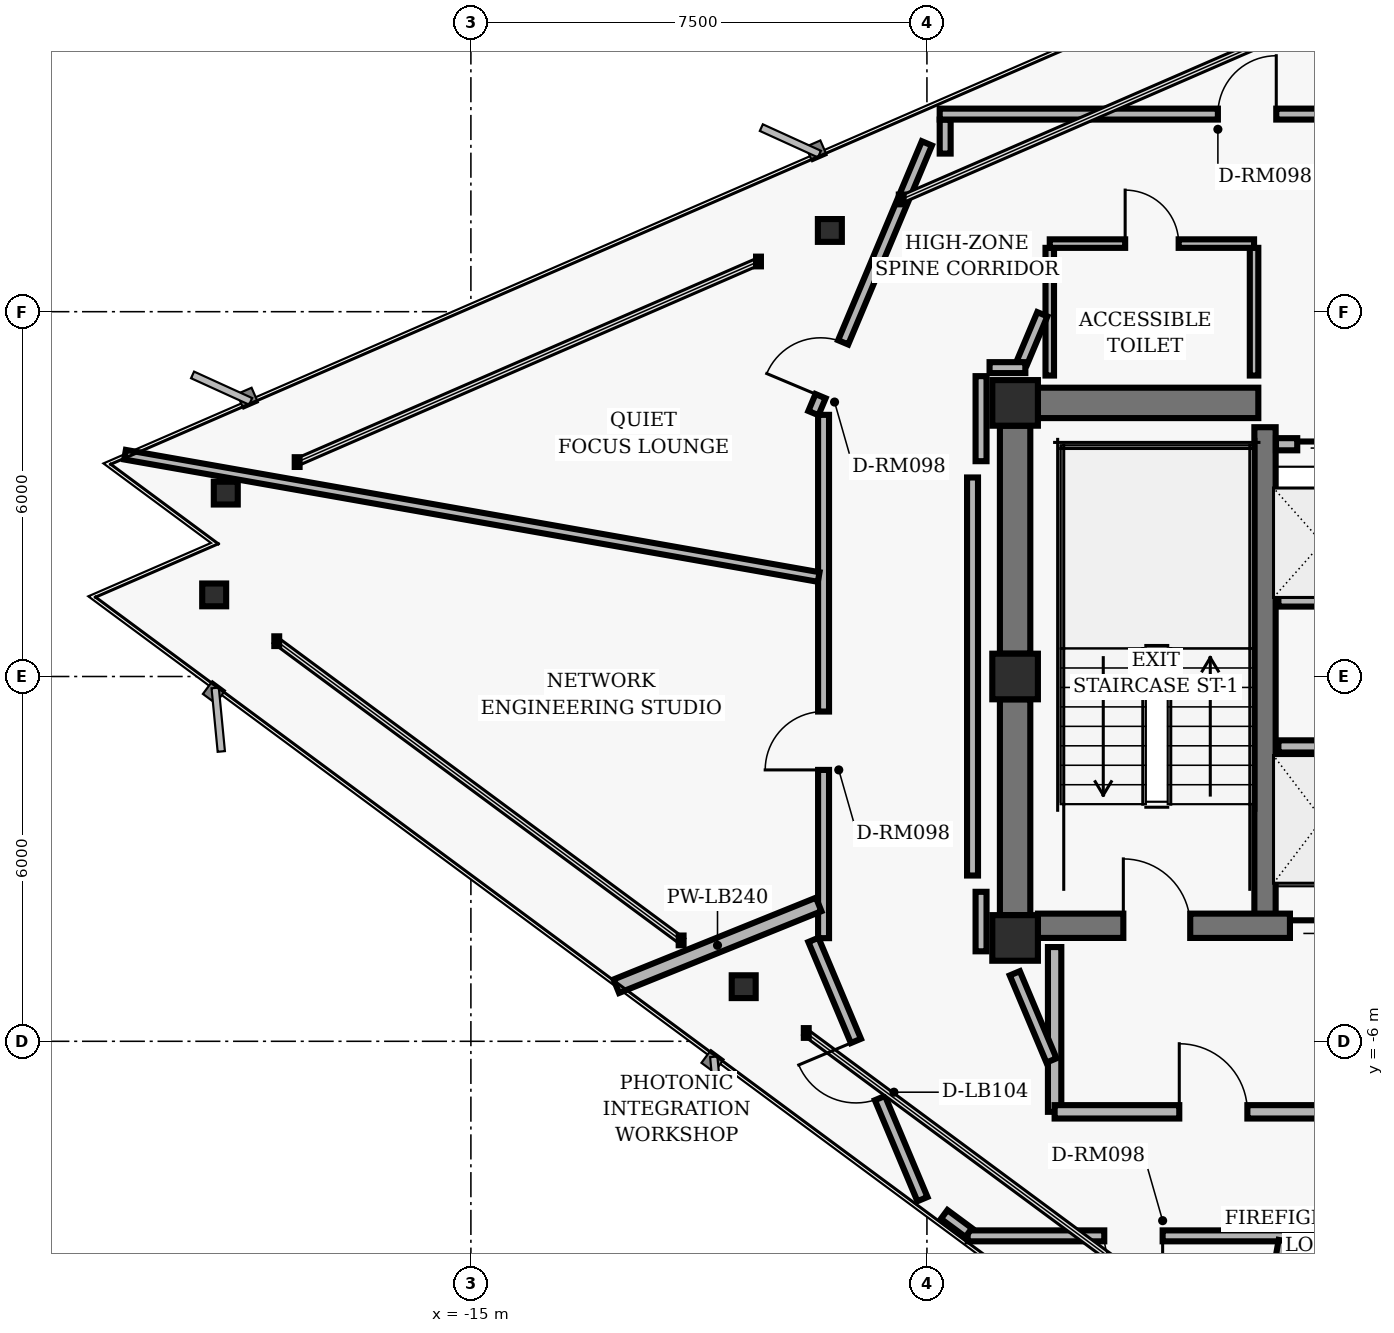
"""IFC4 building model, lengths in metres.
Left out: names, types, materials, properties, quantities, classifications, styles, units other than length and angle.
Written with IfcOpenShell. Run it as: python <this file> out.ifc"""

import sys

from ifc_helpers import new_model, si_unit, direction, frame, frame_2d, origin, origin_2d, place, context, subcontext, project, spatial, rectangle, hollow_rectangle, i_section, extrude, element, fill, save


model = new_model("IFC4")
c1 = context("Model", 3, precision=1e-05, world=origin(), true_north=direction((0.0, 1.0)))
c2 = subcontext(c1, "Body", "Model", "MODEL_VIEW")
j1 = project(units=[si_unit("LENGTHUNIT", "METRE"), si_unit("PLANEANGLEUNIT", "RADIAN")], contexts=[c1])
p1 = place(None, origin())
s1 = spatial("IfcSite", under=j1, at=p1, CompositionType="ELEMENT")
p2 = place(p1, origin())
s2 = spatial("IfcBuilding", under=s1, at=p2, CompositionType="ELEMENT")
p3 = place(p2, frame((0.0, 0.0, 214.88)))
s3 = spatial("IfcBuildingStorey", under=s2, at=p3, CompositionType="ELEMENT", Elevation=214.88)
for number, where, z_axis, x_axis in (
    (1, (-6.05, 4.5, 0.0), (0.0, 0.0, 1.0), (1.0, 0.0, 0.0)),
    (2, (-6.05, 0.0, 0.0), (0.0, 0.0, 1.0), (1.0, 0.0, 0.0)),
    (3, (-6.05, -4.3, 0.0), (0.0, 0.0, 1.0), (1.0, 0.0, 0.0)),
):
    element("IfcColumn", number, at=place(p3, frame(where, z_axis=z_axis, x_axis=x_axis)), inside=s3, PredefinedType="COLUMN", context=c2, shape_type="SweptSolid", body=[
        extrude(hollow_rectangle(XDim=0.75, YDim=0.75, WallThickness=0.05, InnerFilletRadius=0.02, OuterFilletRadius=0.04, at=origin_2d()), origin(), (0.0, 0.0, 1.0), 3.04),
    ])
p4 = place(p3, frame((-6.05, 0.375, 0.0), z_axis=(0.0, 0.0, 1.0), x_axis=(0.0, 1.0, 0.0)))
e4 = element("IfcWall", 4, at=p4, inside=s3, PredefinedType="SHEAR", context=c2, shape_type="SweptSolid", body=[
    extrude(rectangle(XDim=3.75, YDim=0.5, at=frame_2d((1.875, 0.0))), origin(), (0.0, 0.0, 1.0), 2.798),
])
p5 = place(p3, frame((-6.05, -3.925, 0.0), z_axis=(0.0, 0.0, 1.0), x_axis=(0.0, 1.0, 0.0)))
e5 = element("IfcWall", 5, at=p5, inside=s3, PredefinedType="SHEAR", context=c2, shape_type="SweptSolid", body=[
    extrude(rectangle(XDim=3.55, YDim=0.5, at=frame_2d((1.775, 0.0))), origin(), (0.0, 0.0, 1.0), 2.798),
])
p6 = place(p3, frame((-1.94, -4.1, 0.0), z_axis=(0.0, 0.0, 1.0), x_axis=(0.0, 1.0, 0.0)))
e6 = element("IfcWall", 6, at=p6, inside=s3, PredefinedType="SHEAR", context=c2, shape_type="SweptSolid", body=[
    extrude(rectangle(XDim=8.2, YDim=0.35, at=frame_2d((4.1, 0.0))), origin(), (0.0, 0.0, 1.0), 2.798),
])
p7 = place(p3, frame((-5.675, -4.1, 0.0), z_axis=(0.0, 0.0, 1.0), x_axis=(1.0, 0.0, 0.0)))
e7 = element("IfcWall", 7, at=p7, inside=s3, PredefinedType="SHEAR", context=c2, shape_type="SweptSolid", body=[
    extrude(rectangle(XDim=11.35, YDim=0.4, at=frame_2d((5.675, 0.0))), origin(), (0.0, 0.0, 1.0), 2.798),
])
p8 = place(p7, frame((1.405, 0.0, 0.0)))
e8 = element("IfcOpeningElement", 8, at=p8, cuts=e7, PredefinedType="OPENING", context=c2, shape_type="SweptSolid", body=[
    extrude(rectangle(XDim=1.1, YDim=2.04, at=frame_2d((0.55, 1.02))), frame((0.0, 0.21, 0.0), z_axis=(0.0, -1.0, 0.0), x_axis=(1.0, 0.0, 0.0)), (0.0, 0.0, 1.0), 0.42),
])
p9 = place(p7, frame((8.845, 0.0, 0.0)))
e9 = element("IfcOpeningElement", 9, at=p9, cuts=e7, PredefinedType="OPENING", context=c2, shape_type="SweptSolid", body=[
    extrude(rectangle(XDim=1.1, YDim=2.04, at=frame_2d((0.55, 1.02))), frame((0.0, 0.21, 0.0), z_axis=(0.0, -1.0, 0.0), x_axis=(1.0, 0.0, 0.0)), (0.0, 0.0, 1.0), 0.42),
])
p10 = place(p7, frame((4.145, 0.0, 0.0)))
e10 = element("IfcOpeningElement", 10, at=p10, cuts=e7, PredefinedType="OPENING", context=c2, shape_type="SweptSolid", body=[
    extrude(rectangle(XDim=1.06, YDim=2.04, at=frame_2d((0.53, 1.02))), frame((0.0, 0.21, 0.0), z_axis=(0.0, -1.0, 0.0), x_axis=(1.0, 0.0, 0.0)), (0.0, 0.0, 1.0), 0.42),
])
p11 = place(p7, frame((6.145, 0.0, 0.0)))
e11 = element("IfcOpeningElement", 11, at=p11, cuts=e7, PredefinedType="OPENING", context=c2, shape_type="SweptSolid", body=[
    extrude(rectangle(XDim=1.06, YDim=2.04, at=frame_2d((0.53, 1.02))), frame((0.0, 0.21, 0.0), z_axis=(0.0, -1.0, 0.0), x_axis=(1.0, 0.0, 0.0)), (0.0, 0.0, 1.0), 0.42),
])
p12 = place(p3, frame((-5.675, 4.5, 0.0), z_axis=(0.0, 0.0, 1.0), x_axis=(1.0, 0.0, 0.0)))
e12 = element("IfcWall", 12, at=p12, inside=s3, PredefinedType="SHEAR", context=c2, shape_type="SweptSolid", body=[
    extrude(rectangle(XDim=3.625, YDim=0.5, at=frame_2d((1.812, 0.0))), origin(), (0.0, 0.0, 1.0), 2.798),
])
for number, where, z_axis, x_axis in (
    (13, (-9.096, 7.336, 0.0), (0.0, 0.0, 1.0), (1.0, 0.0, 0.0)),
    (14, (-19.031, 3.016, 0.0), (0.0, 0.0, 1.0), (1.0, 0.0, 0.0)),
    (15, (-19.222, 1.342, 0.0), (0.0, 0.0, 1.0), (1.0, 0.0, 0.0)),
    (16, (-10.513, -5.102, 0.0), (0.0, 0.0, 1.0), (1.0, 0.0, 0.0)),
):
    element("IfcColumn", number, at=place(p3, frame(where, z_axis=z_axis, x_axis=x_axis)), inside=s3, PredefinedType="COLUMN", context=c2, shape_type="SweptSolid", body=[
        extrude(i_section(OverallWidth=0.394, OverallDepth=0.375, WebThickness=0.017, FlangeThickness=0.028, FilletRadius=0.016, at=origin_2d()), origin(), (0.0, 0.0, 1.0), 3.04),
    ])
p13 = place(p3, frame((-1.72, -1.15, 0.0), z_axis=(0.0, 0.0, 1.0), x_axis=(1.0, 0.0, 0.0)))
e17 = element("IfcWall", 17, at=p13, inside=s3, PredefinedType="PARTITIONING", context=c2, shape_type="SweptSolid", body=[
    extrude(rectangle(XDim=3.44, YDim=0.2, at=frame_2d((1.72, 0.0))), origin(), (0.0, 0.0, 1.0), 2.773),
])
p14 = place(p3, frame((-5.4, -7.16, 0.0), z_axis=(0.0, 0.0, 1.0), x_axis=(0.0, 1.0, 0.0)))
e18 = element("IfcWall", 18, at=p14, inside=s3, PredefinedType="PARTITIONING", context=c2, shape_type="SweptSolid", body=[
    extrude(rectangle(XDim=2.71, YDim=0.22, at=frame_2d((1.355, 0.0))), origin(), (0.0, 0.0, 1.0), 2.773),
])
p15 = place(p3, frame((-5.4, -7.16, 0.0), z_axis=(0.0, 0.0, 1.0), x_axis=(1.0, 0.0, 0.0)))
e19 = element("IfcWall", 19, at=p15, inside=s3, PredefinedType="PARTITIONING", context=c2, shape_type="SweptSolid", body=[
    extrude(rectangle(XDim=5.4, YDim=0.22, at=frame_2d((2.7, 0.0))), origin(), (0.0, 0.0, 1.0), 2.395),
])
p16 = place(p15, frame((2.05, 0.0, 0.0)))
e20 = element("IfcOpeningElement", 20, at=p16, cuts=e19, PredefinedType="OPENING", context=c2, shape_type="SweptSolid", body=[
    extrude(rectangle(XDim=1.12, YDim=2.02, at=frame_2d((0.56, 1.01))), frame((0.0, 0.12, 0.0), z_axis=(0.0, -1.0, 0.0), x_axis=(1.0, 0.0, 0.0)), (0.0, 0.0, 1.0), 0.24),
])
p17 = place(p3, frame((-1.72, 1.25, 0.0), z_axis=(0.0, 0.0, 1.0), x_axis=(1.0, 0.0, 0.0)))
e21 = element("IfcWall", 21, at=p17, inside=s3, PredefinedType="PARTITIONING", context=c2, shape_type="SweptSolid", body=[
    extrude(rectangle(XDim=3.44, YDim=0.2, at=frame_2d((1.72, 0.0))), origin(), (0.0, 0.0, 1.0), 2.773),
])
p18 = place(p3, frame((-1.76, 3.82, 0.0), z_axis=(0.0, 0.0, 1.0), x_axis=(1.0, 0.0, 0.0)))
e22 = element("IfcWall", 22, at=p18, inside=s3, PredefinedType="PARTITIONING", context=c2, shape_type="SweptSolid", body=[
    extrude(rectangle(XDim=3.52, YDim=0.2, at=frame_2d((1.76, 0.0))), origin(), (0.0, 0.0, 1.0), 2.773),
])
p19 = place(p18, frame((0.35, 0.0, 0.0)))
e23 = element("IfcOpeningElement", 23, at=p19, cuts=e22, PredefinedType="OPENING", context=c2, shape_type="SweptSolid", body=[
    extrude(rectangle(XDim=1.06, YDim=2.04, at=frame_2d((0.53, 1.02))), frame((0.0, 0.11, 0.0), z_axis=(0.0, -1.0, 0.0), x_axis=(1.0, 0.0, 0.0)), (0.0, 0.0, 1.0), 0.22),
])
p20 = place(p18, frame((2.11, 0.0, 0.0)))
e24 = element("IfcOpeningElement", 24, at=p20, cuts=e22, PredefinedType="OPENING", context=c2, shape_type="SweptSolid", body=[
    extrude(rectangle(XDim=1.06, YDim=2.04, at=frame_2d((0.53, 1.02))), frame((0.0, 0.11, 0.0), z_axis=(0.0, -1.0, 0.0), x_axis=(1.0, 0.0, 0.0)), (0.0, 0.0, 1.0), 0.22),
])
for number, where, z_axis, x_axis in (
    (25, (-5.48, 4.95, 0.0), (0.0, 0.0, 1.0), (0.0, 1.0, 0.0)),
    (26, (-2.12, 4.95, 0.0), (0.0, 0.0, 1.0), (0.0, 1.0, 0.0)),
):
    element("IfcWall", number, at=place(p3, frame(where, z_axis=z_axis, x_axis=x_axis)), inside=s3, PredefinedType="PARTITIONING", context=c2, shape_type="SweptSolid", body=[
        extrude(rectangle(XDim=2.1, YDim=0.14, at=frame_2d((1.05, 0.0))), origin(), (0.0, 0.0, 1.0), 2.773),
    ])
p21 = place(p3, frame((-5.48, 7.12, 0.0), z_axis=(0.0, 0.0, 1.0), x_axis=(1.0, 0.0, 0.0)))
e27 = element("IfcWall", 27, at=p21, inside=s3, PredefinedType="PARTITIONING", context=c2, shape_type="SweptSolid", body=[
    extrude(rectangle(XDim=3.36, YDim=0.14, at=frame_2d((1.68, 0.0))), origin(), (0.0, 0.0, 1.0), 2.395),
])
p22 = place(p21, frame((1.24, 0.0, 0.0)))
e28 = element("IfcOpeningElement", 28, at=p22, cuts=e27, PredefinedType="OPENING", context=c2, shape_type="SweptSolid", body=[
    extrude(rectangle(XDim=0.88, YDim=2.02, at=frame_2d((0.44, 1.01))), frame((0.0, 0.08, 0.0), z_axis=(0.0, -1.0, 0.0), x_axis=(1.0, 0.0, 0.0)), (0.0, 0.0, 1.0), 0.16),
])
p23 = place(p3, frame((-7.574, -8.596, 0.0), z_axis=(0.0, 0.0, 1.0), x_axis=(-0.38757793583, 0.921836939842, 0.0)))
e29 = element("IfcWall", 29, at=p23, inside=s3, PredefinedType="PARTITIONING", context=c2, shape_type="SweptSolid", body=[
    extrude(rectangle(XDim=4.625, YDim=0.18, at=frame_2d((2.313, 0.0))), origin(), (0.0, 0.0, 1.0), 2.773),
])
p24 = place(p23, frame((1.803, 0.0, 0.0)))
e30 = element("IfcOpeningElement", 30, at=p24, cuts=e29, PredefinedType="OPENING", context=c2, shape_type="SweptSolid", body=[
    extrude(rectangle(XDim=1.02, YDim=2.02, at=frame_2d((0.51, 1.01))), frame((0.0, 0.1, 0.0), z_axis=(0.0, -1.0, 0.0), x_axis=(1.0, 0.0, 0.0)), (0.0, 0.0, 1.0), 0.2),
])
p25 = place(p3, frame((-9.2, -4.303, 0.0), z_axis=(0.0, 0.0, 1.0), x_axis=(0.0, 1.0, 0.0)))
e31 = element("IfcWall", 31, at=p25, inside=s3, PredefinedType="PARTITIONING", context=c2, shape_type="SweptSolid", body=[
    extrude(rectangle(XDim=8.607, YDim=0.18, at=frame_2d((4.303, 0.0))), origin(), (0.0, 0.0, 1.0), 2.773),
])
p26 = place(p25, frame((2.767, 0.0, 0.0)))
e32 = element("IfcOpeningElement", 32, at=p26, cuts=e31, PredefinedType="OPENING", context=c2, shape_type="SweptSolid", body=[
    extrude(rectangle(XDim=0.96, YDim=2.02, at=frame_2d((0.48, 1.01))), frame((0.0, 0.1, 0.0), z_axis=(0.0, -1.0, 0.0), x_axis=(1.0, 0.0, 0.0)), (0.0, 0.0, 1.0), 0.2),
])
p27 = place(p3, frame((-9.367, 4.332, 0.0), z_axis=(0.0, 0.0, 1.0), x_axis=(0.387573945081, 0.921838617706, 0.0)))
e33 = element("IfcWall", 33, at=p27, inside=s3, PredefinedType="PARTITIONING", context=c2, shape_type="SweptSolid", body=[
    extrude(rectangle(XDim=4.813, YDim=0.18, at=frame_2d((2.407, 0.0))), origin(), (0.0, 0.0, 1.0), 2.773),
])
p28 = place(p27, frame((0.302, 0.0, 0.0)))
e34 = element("IfcOpeningElement", 34, at=p28, cuts=e33, PredefinedType="OPENING", context=c2, shape_type="SweptSolid", body=[
    extrude(rectangle(XDim=0.96, YDim=2.02, at=frame_2d((0.48, 1.01))), frame((0.0, 0.1, 0.0), z_axis=(0.0, -1.0, 0.0), x_axis=(1.0, 0.0, 0.0)), (0.0, 0.0, 1.0), 0.2),
])
p29 = place(p3, frame((-7.2, 8.601, 0.0), z_axis=(0.0, 0.0, 1.0), x_axis=(0.0, 1.0, 0.0)))
e35 = element("IfcWall", 35, at=p29, inside=s3, PredefinedType="PARTITIONING", context=c2, shape_type="SweptSolid", body=[
    extrude(rectangle(XDim=0.559, YDim=0.18, at=frame_2d((0.28, 0.0))), origin(), (0.0, 0.0, 1.0), 2.773),
])
p30 = place(p3, frame((-7.29, 9.25, 0.0), z_axis=(0.0, 0.0, 1.0), x_axis=(1.0, 0.0, 0.0)))
e36 = element("IfcWall", 36, at=p30, inside=s3, PredefinedType="PARTITIONING", context=c2, shape_type="SweptSolid", body=[
    extrude(rectangle(XDim=13.3, YDim=0.18, at=frame_2d((6.65, 0.0))), origin(), (0.0, 0.0, 1.0), 2.395),
])
p31 = place(p30, frame((10.819, 0.0, 0.0)))
e37 = element("IfcOpeningElement", 37, at=p31, cuts=e36, PredefinedType="OPENING", context=c2, shape_type="SweptSolid", body=[
    extrude(rectangle(XDim=1.02, YDim=2.02, at=frame_2d((0.51, 1.01))), frame((0.0, 0.1, 0.0), z_axis=(0.0, -1.0, 0.0), x_axis=(1.0, 0.0, 0.0)), (0.0, 0.0, 1.0), 0.2),
])
p32 = place(p30, frame((4.575, 0.0, 0.0)))
e38 = element("IfcOpeningElement", 38, at=p32, cuts=e36, PredefinedType="OPENING", context=c2, shape_type="SweptSolid", body=[
    extrude(rectangle(XDim=0.96, YDim=2.02, at=frame_2d((0.48, 1.01))), frame((0.0, 0.1, 0.0), z_axis=(0.0, -1.0, 0.0), x_axis=(1.0, 0.0, 0.0)), (0.0, 0.0, 1.0), 0.2),
])
p33 = place(p3, frame((-5.602, 5.958, 0.0), z_axis=(0.0, 0.0, 1.0), x_axis=(-0.387588639363, -0.921832439566, 0.0)))
e39 = element("IfcWall", 39, at=p33, inside=s3, PredefinedType="PARTITIONING", context=c2, shape_type="SweptSolid", body=[
    extrude(rectangle(XDim=0.862, YDim=0.18, at=frame_2d((0.431, 0.0))), origin(), (0.0, 0.0, 1.0), 2.773),
])
p34 = place(p3, frame((-5.881, 5.08, 0.0), z_axis=(0.0, 0.0, 1.0), x_axis=(-1.0, 0.0, 0.0)))
e40 = element("IfcWall", 40, at=p34, inside=s3, PredefinedType="PARTITIONING", context=c2, shape_type="SweptSolid", body=[
    extrude(rectangle(XDim=0.589, YDim=0.18, at=frame_2d((0.294, 0.0))), origin(), (0.0, 0.0, 1.0), 2.773),
])
p35 = place(p3, frame((-6.61, 4.94, 0.0), z_axis=(0.0, 0.0, 1.0), x_axis=(0.0, -1.0, 0.0)))
e41 = element("IfcWall", 41, at=p35, inside=s3, PredefinedType="PARTITIONING", context=c2, shape_type="SweptSolid", body=[
    extrude(rectangle(XDim=1.399, YDim=0.18, at=frame_2d((0.699, 0.0))), origin(), (0.0, 0.0, 1.0), 2.773),
])
p36 = place(p3, frame((-6.75, 3.273, 0.0), z_axis=(0.0, 0.0, 1.0), x_axis=(0.0, -1.0, 0.0)))
e42 = element("IfcWall", 42, at=p36, inside=s3, PredefinedType="PARTITIONING", context=c2, shape_type="SweptSolid", body=[
    extrude(rectangle(XDim=6.547, YDim=0.18, at=frame_2d((3.273, 0.0))), origin(), (0.0, 0.0, 1.0), 2.773),
])
p37 = place(p3, frame((-6.61, -3.541, 0.0), z_axis=(0.0, 0.0, 1.0), x_axis=(0.0, -1.0, 0.0)))
e43 = element("IfcWall", 43, at=p37, inside=s3, PredefinedType="PARTITIONING", context=c2, shape_type="SweptSolid", body=[
    extrude(rectangle(XDim=0.979, YDim=0.18, at=frame_2d((0.489, 0.0))), origin(), (0.0, 0.0, 1.0), 2.773),
])
p38 = place(p3, frame((-6.055, -4.882, 0.0), z_axis=(0.0, 0.0, 1.0), x_axis=(0.387579540458, -0.921836265189, 0.0)))
e44 = element("IfcWall", 44, at=p38, inside=s3, PredefinedType="PARTITIONING", context=c2, shape_type="SweptSolid", body=[
    extrude(rectangle(XDim=1.555, YDim=0.18, at=frame_2d((0.777, 0.0))), origin(), (0.0, 0.0, 1.0), 2.253),
])
p39 = place(p3, frame((6.01, -9.2, 0.0), z_axis=(0.0, 0.0, 1.0), x_axis=(-1.0, 0.0, 0.0)))
e45 = element("IfcWall", 45, at=p39, inside=s3, PredefinedType="PARTITIONING", context=c2, shape_type="SweptSolid", body=[
    extrude(rectangle(XDim=12.84, YDim=0.18, at=frame_2d((6.42, 0.0))), origin(), (0.0, 0.0, 1.0), 2.773),
])
p40 = place(p39, frame((9.634, 0.0, 0.0)))
e46 = element("IfcOpeningElement", 46, at=p40, cuts=e45, PredefinedType="OPENING", context=c2, shape_type="SweptSolid", body=[
    extrude(rectangle(XDim=0.96, YDim=2.02, at=frame_2d((0.48, 1.01))), frame((0.0, 0.1, 0.0), z_axis=(0.0, -1.0, 0.0), x_axis=(1.0, 0.0, 0.0)), (0.0, 0.0, 1.0), 0.2),
])
p41 = place(p39, frame((3.473, 0.0, 0.0)))
e47 = element("IfcOpeningElement", 47, at=p41, cuts=e45, PredefinedType="OPENING", context=c2, shape_type="SweptSolid", body=[
    extrude(rectangle(XDim=0.96, YDim=2.02, at=frame_2d((0.48, 1.01))), frame((0.0, 0.1, 0.0), z_axis=(0.0, -1.0, 0.0), x_axis=(1.0, 0.0, 0.0)), (0.0, 0.0, 1.0), 0.2),
])
p42 = place(p3, frame((-6.812, -9.146, 0.0), z_axis=(0.0, 0.0, 1.0), x_axis=(-0.803893055119, 0.594773869577, 0.0)))
e48 = element("IfcWall", 48, at=p42, inside=s3, PredefinedType="PARTITIONING", context=c2, shape_type="SweptSolid", body=[
    extrude(rectangle(XDim=0.502, YDim=0.18, at=frame_2d((0.251, 0.0))), origin(), (0.0, 0.0, 1.0), 2.773),
])
p43 = place(p3, frame((-9.28, -3.75, 0.0), z_axis=(0.0, 0.0, 1.0), x_axis=(-0.927209590074, -0.374542889499, 0.0)))
e49 = element("IfcWall", 49, at=p43, inside=s3, PredefinedType="PARTITIONING", context=c2, shape_type="SweptSolid", body=[
    extrude(rectangle(XDim=3.59, YDim=0.24, at=frame_2d((1.795, 0.0))), origin(), (0.0, 0.0, 1.0), 2.773),
])
p44 = place(p3, frame((-1.636, -9.28, 0.0), z_axis=(0.0, 0.0, 1.0), x_axis=(-0.17367100135, -0.984803728308, 0.0)))
e50 = element("IfcWall", 50, at=p44, inside=s3, PredefinedType="PARTITIONING", context=c2, shape_type="SweptSolid", body=[
    extrude(rectangle(XDim=3.533, YDim=0.16, at=frame_2d((1.766, 0.0))), origin(), (0.0, 0.0, 1.0), 2.773),
])
p45 = place(p3, frame((-9.28, 1.636, 0.0), z_axis=(0.0, 0.0, 1.0), x_axis=(-0.984805616272, 0.173660295285, 0.0)))
e51 = element("IfcWall", 51, at=p45, inside=s3, PredefinedType="PARTITIONING", context=c2, shape_type="SweptSolid", body=[
    extrude(rectangle(XDim=11.584, YDim=0.16, at=frame_2d((5.792, 0.0))), origin(), (0.0, 0.0, 1.0), 2.253),
])
p46 = place(p8, origin())
e52 = element("IfcDoor", 52, at=p46, inside=s3, OperationType="SINGLE_SWING_LEFT", PredefinedType="DOOR", context=c2, shape_type="SweptSolid", body=[
    extrude(rectangle(XDim=1.1, YDim=2.04, at=frame_2d((0.55, 1.02))), frame((0.0, 0.025, 0.0), z_axis=(0.0, -1.0, 0.0), x_axis=(1.0, 0.0, 0.0)), (0.0, 0.0, 1.0), 0.05),
])
fill(e8, e52)
p47 = place(p10, origin())
e53 = element("IfcDoor", 53, at=p47, inside=s3, OperationType="SLIDING_TO_LEFT", PredefinedType="DOOR", context=c2, shape_type="SweptSolid", body=[
    extrude(rectangle(XDim=1.06, YDim=2.04, at=frame_2d((0.53, 1.02))), frame((0.0, 0.025, 0.0), z_axis=(0.0, -1.0, 0.0), x_axis=(1.0, 0.0, 0.0)), (0.0, 0.0, 1.0), 0.05),
])
fill(e10, e53)
p48 = place(p16, origin())
e54 = element("IfcDoor", 54, at=p48, inside=s3, OperationType="SINGLE_SWING_LEFT", PredefinedType="DOOR", context=c2, shape_type="SweptSolid", body=[
    extrude(rectangle(XDim=1.12, YDim=2.02, at=frame_2d((0.56, 1.01))), frame((0.0, 0.025, 0.0), z_axis=(0.0, -1.0, 0.0), x_axis=(1.0, 0.0, 0.0)), (0.0, 0.0, 1.0), 0.05),
])
fill(e20, e54)
p49 = place(p19, origin())
e55 = element("IfcDoor", 55, at=p49, inside=s3, OperationType="SLIDING_TO_LEFT", PredefinedType="DOOR", context=c2, shape_type="SweptSolid", body=[
    extrude(rectangle(XDim=1.06, YDim=2.04, at=frame_2d((0.53, 1.02))), frame((0.0, 0.025, 0.0), z_axis=(0.0, -1.0, 0.0), x_axis=(1.0, 0.0, 0.0)), (0.0, 0.0, 1.0), 0.05),
])
fill(e23, e55)
p50 = place(p22, origin())
e56 = element("IfcDoor", 56, at=p50, inside=s3, OperationType="SINGLE_SWING_LEFT", PredefinedType="DOOR", context=c2, shape_type="SweptSolid", body=[
    extrude(rectangle(XDim=0.88, YDim=2.02, at=frame_2d((0.44, 1.01))), frame((0.0, 0.025, 0.0), z_axis=(0.0, -1.0, 0.0), x_axis=(1.0, 0.0, 0.0)), (0.0, 0.0, 1.0), 0.05),
])
fill(e28, e56)
p51 = place(p26, origin())
e57 = element("IfcDoor", 57, at=p51, inside=s3, OperationType="SINGLE_SWING_LEFT", PredefinedType="DOOR", context=c2, shape_type="SweptSolid", body=[
    extrude(rectangle(XDim=0.96, YDim=2.02, at=frame_2d((0.48, 1.01))), frame((0.0, 0.025, 0.0), z_axis=(0.0, -1.0, 0.0), x_axis=(1.0, 0.0, 0.0)), (0.0, 0.0, 1.0), 0.05),
])
fill(e32, e57)
p52 = place(p24, origin())
e58 = element("IfcDoor", 58, at=p52, inside=s3, OperationType="SINGLE_SWING_RIGHT", PredefinedType="DOOR", context=c2, shape_type="SweptSolid", body=[
    extrude(rectangle(XDim=1.02, YDim=2.02, at=frame_2d((0.51, 1.01))), frame((0.0, 0.025, 0.0), z_axis=(0.0, -1.0, 0.0), x_axis=(1.0, 0.0, 0.0)), (0.0, 0.0, 1.0), 0.05),
])
fill(e30, e58)
p53 = place(p40, origin())
e59 = element("IfcDoor", 59, at=p53, inside=s3, OperationType="SINGLE_SWING_LEFT", PredefinedType="DOOR", context=c2, shape_type="SweptSolid", body=[
    extrude(rectangle(XDim=0.96, YDim=2.02, at=frame_2d((0.48, 1.01))), frame((0.0, 0.025, 0.0), z_axis=(0.0, -1.0, 0.0), x_axis=(1.0, 0.0, 0.0)), (0.0, 0.0, 1.0), 0.05),
])
fill(e46, e59)
p54 = place(p32, origin())
e60 = element("IfcDoor", 60, at=p54, inside=s3, OperationType="SINGLE_SWING_RIGHT", PredefinedType="DOOR", context=c2, shape_type="SweptSolid", body=[
    extrude(rectangle(XDim=0.96, YDim=2.02, at=frame_2d((0.48, 1.01))), frame((0.0, 0.025, 0.0), z_axis=(0.0, -1.0, 0.0), x_axis=(1.0, 0.0, 0.0)), (0.0, 0.0, 1.0), 0.05),
])
fill(e38, e60)
p55 = place(p28, origin())
e61 = element("IfcDoor", 61, at=p55, inside=s3, OperationType="SINGLE_SWING_LEFT", PredefinedType="DOOR", context=c2, shape_type="SweptSolid", body=[
    extrude(rectangle(XDim=0.96, YDim=2.02, at=frame_2d((0.48, 1.01))), frame((0.0, 0.025, 0.0), z_axis=(0.0, -1.0, 0.0), x_axis=(1.0, 0.0, 0.0)), (0.0, 0.0, 1.0), 0.05),
])
fill(e34, e61)
save(model, sys.argv[1])
